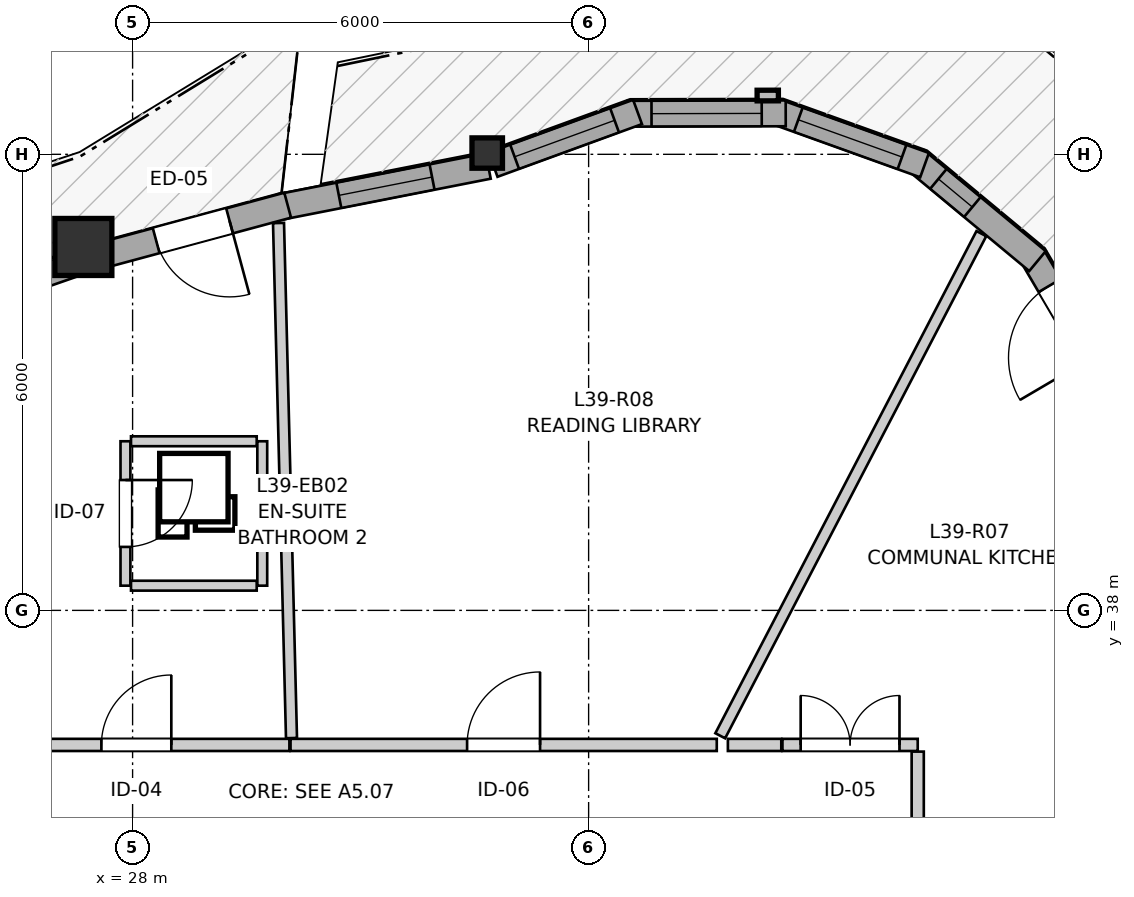
"""IFC4 building model, lengths in metres.
Left out: names, types, materials, properties, quantities, classifications, styles, units other than length and angle.
Written with IfcOpenShell. Run it as: python <this file> out.ifc"""

import sys

from ifc_helpers import new_model, si_unit, direction, frame, frame_2d, origin, origin_2d, place, context, subcontext, project, spatial, rectangle, i_section, extrude, source, transform, mapped, element, fill, save


model = new_model("IFC4")
c1 = context("Model", 3, precision=1e-05, world=origin(), true_north=direction((0.0, 1.0)))
c2 = subcontext(c1, "Body", "Model", "MODEL_VIEW")
j1 = project(units=[si_unit("LENGTHUNIT", "METRE"), si_unit("PLANEANGLEUNIT", "RADIAN")], contexts=[c1])
p1 = place(None, origin())
s1 = spatial("IfcSite", under=j1, at=p1, CompositionType="ELEMENT")
p2 = place(p1, origin())
s2 = spatial("IfcBuilding", under=s1, at=p2, CompositionType="ELEMENT")
p3 = place(p2, frame((0.0, 0.0, 133.0)))
s3 = spatial("IfcBuildingStorey", under=s2, at=p3, CompositionType="ELEMENT", Elevation=133.0)
m1 = source(origin(), c2, "Body", "SweptSolid", [
    extrude(i_section(OverallWidth=0.401, OverallDepth=0.399, WebThickness=0.023, FlangeThickness=0.036, FilletRadius=0.015, at=origin_2d()), origin(), (0.0, 0.0, 1.0), 2.95),
])
p4 = place(p3, frame((32.666, 44.017, 0.0), z_axis=(0.0, 0.0, 1.0), x_axis=(1.0, 0.0, 0.0)))
e1 = element("IfcColumn", 1, at=p4, inside=s3, PredefinedType="PILASTER", context=c2, shape_type="MappedRepresentation", body=[
    mapped(m1, transform((0.0, 0.0, 0.0), x_axis=(1.0, 0.0, 0.0), y_axis=(0.0, 1.0, 0.0), z_axis=(0.0, 0.0, 1.0), scale=1.0)),
])
m2 = source(origin(), c2, "Body", "SweptSolid", [
    extrude(rectangle(XDim=0.75, YDim=0.75, at=origin_2d()), origin(), (0.0, 0.0, 1.0), 2.95),
])
p5 = place(p3, frame((27.352, 42.781, 0.0), z_axis=(0.0, 0.0, 1.0), x_axis=(1.0, 0.0, 0.0)))
e2 = element("IfcColumn", 2, at=p5, inside=s3, PredefinedType="COLUMN", context=c2, shape_type="MappedRepresentation", body=[
    mapped(m2, transform((0.0, 0.0, 0.0), x_axis=(1.0, 0.0, 0.0), y_axis=(0.0, 1.0, 0.0), z_axis=(0.0, 0.0, 1.0), scale=1.0)),
])
p6 = place(p3, frame((40.873, 40.902, 0.0), z_axis=(0.0, 0.0, 1.0), x_axis=(-0.506225227923, 0.862401309493, 0.0)))
e3 = element("IfcWall", 3, at=p6, inside=s3, PredefinedType="SOLIDWALL", context=c2, shape_type="SweptSolid", body=[
    extrude(rectangle(XDim=2.081, YDim=0.34, at=frame_2d((1.041, 0.0))), origin(), (0.0, 0.0, 1.0), 2.53),
])
p7 = place(p6, frame((0.49, 0.0, 0.0)))
e4 = element("IfcOpeningElement", 4, at=p7, cuts=e3, PredefinedType="OPENING", context=c2, shape_type="SweptSolid", body=[
    extrude(rectangle(XDim=1.1, YDim=2.1, at=frame_2d((0.55, 1.05))), frame((0.0, 0.18, 0.0), z_axis=(0.0, -1.0, 0.0), x_axis=(1.0, 0.0, 0.0)), (0.0, 0.0, 1.0), 0.36),
])
p8 = place(p3, frame((39.906, 42.595, 0.0), z_axis=(0.0, 0.0, 1.0), x_axis=(-0.769584999316, 0.638544382817, 0.0)))
e5 = element("IfcWall", 5, at=p8, inside=s3, PredefinedType="SOLIDWALL", context=c2, shape_type="SweptSolid", body=[
    extrude(rectangle(XDim=2.081, YDim=0.34, at=frame_2d((1.041, 0.0))), origin(), (0.0, 0.0, 1.0), 2.53),
])
p9 = place(p8, frame((1.114, 0.0, 0.82)))
e6 = element("IfcOpeningElement", 6, at=p9, cuts=e5, PredefinedType="OPENING", context=c2, shape_type="SweptSolid", body=[
    extrude(rectangle(XDim=0.58, YDim=1.35, at=frame_2d((0.29, 0.675))), frame((0.0, 0.18, 0.0), z_axis=(0.0, -1.0, 0.0), x_axis=(1.0, 0.0, 0.0)), (0.0, 0.0, 1.0), 0.36),
])
p10 = place(p3, frame((38.42, 43.858, 0.0), z_axis=(0.0, 0.0, 1.0), x_axis=(-0.941071215914, 0.338208466153, 0.0)))
e7 = element("IfcWall", 7, at=p10, inside=s3, PredefinedType="SOLIDWALL", context=c2, shape_type="SweptSolid", body=[
    extrude(rectangle(XDim=2.081, YDim=0.34, at=frame_2d((1.041, 0.0))), origin(), (0.0, 0.0, 1.0), 2.53),
])
p11 = place(p10, frame((0.316, 0.0, 0.82)))
e8 = element("IfcOpeningElement", 8, at=p11, cuts=e7, PredefinedType="OPENING", context=c2, shape_type="SweptSolid", body=[
    extrude(rectangle(XDim=1.45, YDim=1.25, at=frame_2d((0.725, 0.625))), frame((0.0, 0.18, 0.0), z_axis=(0.0, -1.0, 0.0), x_axis=(1.0, 0.0, 0.0)), (0.0, 0.0, 1.0), 0.36),
])
p12 = place(p3, frame((36.593, 44.539, 0.0), z_axis=(0.0, 0.0, 1.0), x_axis=(-0.999996965272, -0.002463624621, 0.0)))
e9 = element("IfcWall", 9, at=p12, inside=s3, PredefinedType="SOLIDWALL", context=c2, shape_type="SweptSolid", body=[
    extrude(rectangle(XDim=2.081, YDim=0.34, at=frame_2d((1.041, 0.0))), origin(), (0.0, 0.0, 1.0), 2.53),
])
p13 = place(p12, frame((0.316, 0.0, 0.82)))
e10 = element("IfcOpeningElement", 10, at=p13, cuts=e9, PredefinedType="OPENING", context=c2, shape_type="SweptSolid", body=[
    extrude(rectangle(XDim=1.45, YDim=1.25, at=frame_2d((0.725, 0.625))), frame((0.0, 0.18, 0.0), z_axis=(0.0, -1.0, 0.0), x_axis=(1.0, 0.0, 0.0)), (0.0, 0.0, 1.0), 0.36),
])
p14 = place(p3, frame((34.644, 44.557, 0.0), z_axis=(0.0, 0.0, 1.0), x_axis=(-0.939440593615, -0.342711790092, 0.0)))
e11 = element("IfcWall", 11, at=p14, inside=s3, PredefinedType="SOLIDWALL", context=c2, shape_type="SweptSolid", body=[
    extrude(rectangle(XDim=2.023, YDim=0.34, at=frame_2d((1.012, 0.0))), origin(), (0.0, 0.0, 1.0), 2.53),
])
p15 = place(p14, frame((0.322, 0.0, 0.82)))
e12 = element("IfcOpeningElement", 12, at=p15, cuts=e11, PredefinedType="OPENING", context=c2, shape_type="SweptSolid", body=[
    extrude(rectangle(XDim=1.4, YDim=1.35, at=frame_2d((0.7, 0.675))), frame((0.0, 0.18, 0.0), z_axis=(0.0, -1.0, 0.0), x_axis=(1.0, 0.0, 0.0)), (0.0, 0.0, 1.0), 0.36),
])
p16 = place(p3, frame((32.679, 43.846, 0.0), z_axis=(0.0, 0.0, 1.0), x_axis=(-0.981247929568, -0.192749839736, 0.0)))
e13 = element("IfcWall", 13, at=p16, inside=s3, PredefinedType="SOLIDWALL", context=c2, shape_type="SweptSolid", body=[
    extrude(rectangle(XDim=2.776, YDim=0.34, at=frame_2d((1.388, 0.0))), origin(), (0.0, 0.0, 1.0), 2.53),
])
p17 = place(p16, frame((0.753, 0.0, 0.82)))
e14 = element("IfcOpeningElement", 14, at=p17, cuts=e13, PredefinedType="OPENING", context=c2, shape_type="SweptSolid", body=[
    extrude(rectangle(XDim=1.25, YDim=1.35, at=frame_2d((0.625, 0.675))), frame((0.0, 0.18, 0.0), z_axis=(0.0, -1.0, 0.0), x_axis=(1.0, 0.0, 0.0)), (0.0, 0.0, 1.0), 0.36),
])
p18 = place(p3, frame((30.04, 43.331, 0.0), z_axis=(0.0, 0.0, 1.0), x_axis=(-0.965460468502, -0.260549580233, 0.0)))
e15 = element("IfcWall", 15, at=p18, inside=s3, PredefinedType="SOLIDWALL", context=c2, shape_type="SweptSolid", body=[
    extrude(rectangle(XDim=2.583, YDim=0.34, at=frame_2d((1.292, 0.0))), origin(), (0.0, 0.0, 1.0), 2.53),
])
p19 = place(p18, frame((0.792, 0.0, 0.0)))
e16 = element("IfcOpeningElement", 16, at=p19, cuts=e15, PredefinedType="OPENING", context=c2, shape_type="SweptSolid", body=[
    extrude(rectangle(XDim=1.0, YDim=2.1, at=frame_2d((0.5, 1.05))), frame((0.0, 0.18, 0.0), z_axis=(0.0, -1.0, 0.0), x_axis=(1.0, 0.0, 0.0)), (0.0, 0.0, 1.0), 0.36),
])
p20 = place(p3, frame((27.262, 42.57, 0.0), z_axis=(0.0, 0.0, 1.0), x_axis=(-0.944148723561, -0.329519631884, 0.0)))
e17 = element("IfcWall", 17, at=p20, inside=s3, PredefinedType="SOLIDWALL", context=c2, shape_type="SweptSolid", body=[
    extrude(rectangle(XDim=2.54, YDim=0.34, at=frame_2d((1.27, 0.0))), origin(), (0.0, 0.0, 1.0), 2.53),
])
p21 = place(p20, frame((0.54, 0.0, 0.82)))
e18 = element("IfcOpeningElement", 18, at=p21, cuts=e17, PredefinedType="OPENING", context=c2, shape_type="SweptSolid", body=[
    extrude(rectangle(XDim=1.45, YDim=1.25, at=frame_2d((0.725, 0.625))), frame((0.0, 0.18, 0.0), z_axis=(0.0, -1.0, 0.0), x_axis=(1.0, 0.0, 0.0)), (0.0, 0.0, 1.0), 0.36),
])
p22 = place(p3, frame((30.078, 36.23, 0.0), z_axis=(0.0, 0.0, 1.0), x_axis=(1.0, 0.0, 0.0)))
e19 = element("IfcWall", 19, at=p22, inside=s3, PredefinedType="PARTITIONING", context=c2, shape_type="SweptSolid", body=[
    extrude(rectangle(XDim=5.608, YDim=0.16, at=frame_2d((2.804, 0.0))), origin(), (0.0, 0.0, 1.0), 2.588),
])
p23 = place(p22, frame((2.323, 0.0, 0.0)))
e20 = element("IfcOpeningElement", 20, at=p23, cuts=e19, PredefinedType="OPENING", context=c2, shape_type="SweptSolid", body=[
    extrude(rectangle(XDim=0.96, YDim=2.1, at=frame_2d((0.48, 1.05))), frame((0.0, 0.09, 0.0), z_axis=(0.0, -1.0, 0.0), x_axis=(1.0, 0.0, 0.0)), (0.0, 0.0, 1.0), 0.18),
])
p24 = place(p3, frame((25.99, 36.23, 0.0), z_axis=(0.0, 0.0, 1.0), x_axis=(1.0, 0.0, 0.0)))
e21 = element("IfcWall", 21, at=p24, inside=s3, PredefinedType="PARTITIONING", context=c2, shape_type="SweptSolid", body=[
    extrude(rectangle(XDim=4.073, YDim=0.16, at=frame_2d((2.037, 0.0))), origin(), (0.0, 0.0, 1.0), 2.95),
])
p25 = place(p24, frame((1.6, 0.0, 0.0)))
e22 = element("IfcOpeningElement", 22, at=p25, cuts=e21, PredefinedType="OPENING", context=c2, shape_type="SweptSolid", body=[
    extrude(rectangle(XDim=0.92, YDim=2.1, at=frame_2d((0.46, 1.05))), frame((0.0, 0.09, 0.0), z_axis=(0.0, -1.0, 0.0), x_axis=(1.0, 0.0, 0.0)), (0.0, 0.0, 1.0), 0.18),
])
p26 = place(p3, frame((27.906, 40.225, 0.0), z_axis=(0.0, 0.0, 1.0), x_axis=(0.0, -1.0, 0.0)))
e23 = element("IfcWall", 23, at=p26, inside=s3, PredefinedType="PARTITIONING", context=c2, shape_type="SweptSolid", body=[
    extrude(rectangle(XDim=1.9, YDim=0.13, at=frame_2d((0.95, 0.0))), origin(), (0.0, 0.0, 1.0), 2.318),
])
p27 = place(p26, frame((0.51, 0.0, 0.0)))
e24 = element("IfcOpeningElement", 24, at=p27, cuts=e23, PredefinedType="OPENING", context=c2, shape_type="SweptSolid", body=[
    extrude(rectangle(XDim=0.88, YDim=2.05, at=frame_2d((0.44, 1.025))), frame((0.0, 0.075, 0.0), z_axis=(0.0, -1.0, 0.0), x_axis=(1.0, 0.0, 0.0)), (0.0, 0.0, 1.0), 0.15),
])
p28 = place(p3, frame((36.55, 36.23, 0.0), z_axis=(0.0, 0.0, 1.0), x_axis=(1.0, 0.0, 0.0)))
e25 = element("IfcWall", 25, at=p28, inside=s3, PredefinedType="PARTITIONING", context=c2, shape_type="SweptSolid", body=[
    extrude(rectangle(XDim=1.78, YDim=0.16, at=frame_2d((0.89, 0.0))), origin(), (0.0, 0.0, 1.0), 2.95),
])
p29 = place(p28, frame((0.24, 0.0, 0.0)))
e26 = element("IfcOpeningElement", 26, at=p29, cuts=e25, PredefinedType="OPENING", context=c2, shape_type="SweptSolid", body=[
    extrude(rectangle(XDim=1.3, YDim=2.1, at=frame_2d((0.65, 1.05))), frame((0.0, 0.09, 0.0), z_axis=(0.0, -1.0, 0.0), x_axis=(1.0, 0.0, 0.0)), (0.0, 0.0, 1.0), 0.18),
])
p30 = place(p3, frame((35.732, 36.351, 0.0), z_axis=(0.0, 0.0, 1.0), x_axis=(0.461386804, 0.887199085378, 0.0)))
e27 = element("IfcWall", 27, at=p30, inside=s3, PredefinedType="PARTITIONING", context=c2, shape_type="SweptSolid", body=[
    extrude(rectangle(XDim=7.446, YDim=0.145, at=frame_2d((3.723, 0.0))), origin(), (0.0, 0.0, 1.0), 2.95),
])
p31 = place(p3, frame((29.92, 43.096, 0.0), z_axis=(0.0, 0.0, 1.0), x_axis=(0.025211755772, -0.999682133166, 0.0)))
e28 = element("IfcWall", 28, at=p31, inside=s3, PredefinedType="PARTITIONING", context=c2, shape_type="SweptSolid", body=[
    extrude(rectangle(XDim=6.779, YDim=0.145, at=frame_2d((3.389, 0.0))), origin(), (0.0, 0.0, 1.0), 2.95),
])
p32 = place(p3, frame((38.465, 33.405, 0.0), z_axis=(0.0, 0.0, 1.0), x_axis=(0.738623645331, 0.674118024205, 0.0)))
e29 = element("IfcWall", 29, at=p32, inside=s3, PredefinedType="PARTITIONING", context=c2, shape_type="SweptSolid", body=[
    extrude(rectangle(XDim=4.629, YDim=0.145, at=frame_2d((2.314, 0.0))), origin(), (0.0, 0.0, 1.0), 2.95),
])
p33 = place(p3, frame((29.706, 38.325, 0.0), z_axis=(0.0, 0.0, 1.0), x_axis=(0.0, 1.0, 0.0)))
e30 = element("IfcWall", 30, at=p33, inside=s3, PredefinedType="PARTITIONING", context=c2, shape_type="SweptSolid", body=[
    extrude(rectangle(XDim=1.9, YDim=0.13, at=frame_2d((0.95, 0.0))), origin(), (0.0, 0.0, 1.0), 2.95),
])
p34 = place(p3, frame((27.979, 40.225, 0.0), z_axis=(0.0, 0.0, 1.0), x_axis=(1.0, 0.0, 0.0)))
e31 = element("IfcWall", 31, at=p34, inside=s3, PredefinedType="PARTITIONING", context=c2, shape_type="SweptSolid", body=[
    extrude(rectangle(XDim=1.654, YDim=0.13, at=frame_2d((0.827, 0.0))), origin(), (0.0, 0.0, 1.0), 2.558),
])
p35 = place(p3, frame((27.979, 38.325, 0.0), z_axis=(0.0, 0.0, 1.0), x_axis=(1.0, 0.0, 0.0)))
e32 = element("IfcWall", 32, at=p35, inside=s3, PredefinedType="PARTITIONING", context=c2, shape_type="SweptSolid", body=[
    extrude(rectangle(XDim=1.654, YDim=0.13, at=frame_2d((0.827, 0.0))), origin(), (0.0, 0.0, 1.0), 2.95),
])
p36 = place(p3, frame((38.33, 34.45, 0.0), z_axis=(0.0, 0.0, 1.0), x_axis=(0.0, 1.0, 0.0)))
e33 = element("IfcWall", 33, at=p36, inside=s3, PredefinedType="PARTITIONING", context=c2, shape_type="SweptSolid", body=[
    extrude(rectangle(XDim=1.692, YDim=0.16, at=frame_2d((0.846, 0.0))), origin(), (0.0, 0.0, 1.0), 2.588),
])
p37 = place(p3, frame((35.832, 36.23, 0.0), z_axis=(0.0, 0.0, 1.0), x_axis=(1.0, 0.0, 0.0)))
e34 = element("IfcWall", 34, at=p37, inside=s3, PredefinedType="PARTITIONING", context=c2, shape_type="SweptSolid", body=[
    extrude(rectangle(XDim=0.703, YDim=0.16, at=frame_2d((0.351, 0.0))), origin(), (0.0, 0.0, 1.0), 2.95),
])
m3 = source(origin(), c2, "Body", "SweptSolid", [
    extrude(rectangle(XDim=1.1, YDim=2.1, at=frame_2d((0.55, 1.05))), frame((0.0, 0.025, 0.0), z_axis=(0.0, -1.0, 0.0), x_axis=(1.0, 0.0, 0.0)), (0.0, 0.0, 1.0), 0.05),
])
p38 = place(p7, origin())
e35 = element("IfcDoor", 35, at=p38, inside=s3, OperationType="SINGLE_SWING_LEFT", PredefinedType="DOOR", context=c2, shape_type="MappedRepresentation", body=[
    mapped(m3, transform((0.0, 0.0, 0.0), x_axis=(1.0, 0.0, 0.0), y_axis=(0.0, 1.0, 0.0), z_axis=(0.0, 0.0, 1.0), scale=1.0)),
])
fill(e4, e35)
m4 = source(origin(), c2, "Body", "SweptSolid", [
    extrude(rectangle(XDim=0.58, YDim=1.35, at=frame_2d((0.29, 0.675))), frame((0.0, 0.03, 0.0), z_axis=(0.0, -1.0, 0.0), x_axis=(1.0, 0.0, 0.0)), (0.0, 0.0, 1.0), 0.06),
])
p39 = place(p9, origin())
e36 = element("IfcWindow", 36, at=p39, inside=s3, PartitioningType="SINGLE_PANEL", PredefinedType="WINDOW", context=c2, shape_type="MappedRepresentation", body=[
    mapped(m4, transform((0.0, 0.0, 0.0), x_axis=(1.0, 0.0, 0.0), y_axis=(0.0, 1.0, 0.0), z_axis=(0.0, 0.0, 1.0), scale=1.0)),
])
fill(e6, e36)
m5 = source(origin(), c2, "Body", "SweptSolid", [
    extrude(rectangle(XDim=1.45, YDim=1.25, at=frame_2d((0.725, 0.625))), frame((0.0, 0.03, 0.0), z_axis=(0.0, -1.0, 0.0), x_axis=(1.0, 0.0, 0.0)), (0.0, 0.0, 1.0), 0.06),
])
p40 = place(p11, origin())
e37 = element("IfcWindow", 37, at=p40, inside=s3, PartitioningType="SINGLE_PANEL", PredefinedType="WINDOW", context=c2, shape_type="MappedRepresentation", body=[
    mapped(m5, transform((0.0, 0.0, 0.0), x_axis=(1.0, 0.0, 0.0), y_axis=(0.0, 1.0, 0.0), z_axis=(0.0, 0.0, 1.0), scale=1.0)),
])
fill(e8, e37)
p41 = place(p13, origin())
e38 = element("IfcWindow", 38, at=p41, inside=s3, PartitioningType="SINGLE_PANEL", PredefinedType="WINDOW", context=c2, shape_type="MappedRepresentation", body=[
    mapped(m5, transform((0.0, 0.0, 0.0), x_axis=(1.0, 0.0, 0.0), y_axis=(0.0, 1.0, 0.0), z_axis=(0.0, 0.0, 1.0), scale=1.0)),
])
fill(e10, e38)
m6 = source(origin(), c2, "Body", "SweptSolid", [
    extrude(rectangle(XDim=1.4, YDim=1.35, at=frame_2d((0.7, 0.675))), frame((0.0, 0.03, 0.0), z_axis=(0.0, -1.0, 0.0), x_axis=(1.0, 0.0, 0.0)), (0.0, 0.0, 1.0), 0.06),
])
p42 = place(p15, origin())
e39 = element("IfcWindow", 39, at=p42, inside=s3, PartitioningType="SINGLE_PANEL", PredefinedType="WINDOW", context=c2, shape_type="MappedRepresentation", body=[
    mapped(m6, transform((0.0, 0.0, 0.0), x_axis=(1.0, 0.0, 0.0), y_axis=(0.0, 1.0, 0.0), z_axis=(0.0, 0.0, 1.0), scale=1.0)),
])
fill(e12, e39)
m7 = source(origin(), c2, "Body", "SweptSolid", [
    extrude(rectangle(XDim=1.25, YDim=1.35, at=frame_2d((0.625, 0.675))), frame((0.0, 0.03, 0.0), z_axis=(0.0, -1.0, 0.0), x_axis=(1.0, 0.0, 0.0)), (0.0, 0.0, 1.0), 0.06),
])
p43 = place(p17, origin())
e40 = element("IfcWindow", 40, at=p43, inside=s3, PartitioningType="SINGLE_PANEL", PredefinedType="WINDOW", context=c2, shape_type="MappedRepresentation", body=[
    mapped(m7, transform((0.0, 0.0, 0.0), x_axis=(1.0, 0.0, 0.0), y_axis=(0.0, 1.0, 0.0), z_axis=(0.0, 0.0, 1.0), scale=1.0)),
])
fill(e14, e40)
m8 = source(origin(), c2, "Body", "SweptSolid", [
    extrude(rectangle(XDim=1.0, YDim=2.1, at=frame_2d((0.5, 1.05))), frame((0.0, 0.025, 0.0), z_axis=(0.0, -1.0, 0.0), x_axis=(1.0, 0.0, 0.0)), (0.0, 0.0, 1.0), 0.05),
])
p44 = place(p19, origin())
e41 = element("IfcDoor", 41, at=p44, inside=s3, OperationType="SINGLE_SWING_LEFT", PredefinedType="DOOR", context=c2, shape_type="MappedRepresentation", body=[
    mapped(m8, transform((0.0, 0.0, 0.0), x_axis=(1.0, 0.0, 0.0), y_axis=(0.0, 1.0, 0.0), z_axis=(0.0, 0.0, 1.0), scale=1.0)),
])
fill(e16, e41)
m9 = source(origin(), c2, "Body", "SweptSolid", [
    extrude(rectangle(XDim=0.96, YDim=2.1, at=frame_2d((0.48, 1.05))), frame((0.0, 0.025, 0.0), z_axis=(0.0, -1.0, 0.0), x_axis=(1.0, 0.0, 0.0)), (0.0, 0.0, 1.0), 0.05),
])
p45 = place(p23, origin())
e42 = element("IfcDoor", 42, at=p45, inside=s3, OperationType="SINGLE_SWING_RIGHT", PredefinedType="DOOR", context=c2, shape_type="MappedRepresentation", body=[
    mapped(m9, transform((0.0, 0.0, 0.0), x_axis=(1.0, 0.0, 0.0), y_axis=(0.0, 1.0, 0.0), z_axis=(0.0, 0.0, 1.0), scale=1.0)),
])
fill(e20, e42)
m10 = source(origin(), c2, "Body", "SweptSolid", [
    extrude(rectangle(XDim=0.92, YDim=2.1, at=frame_2d((0.46, 1.05))), frame((0.0, 0.025, 0.0), z_axis=(0.0, -1.0, 0.0), x_axis=(1.0, 0.0, 0.0)), (0.0, 0.0, 1.0), 0.05),
])
p46 = place(p25, origin())
e43 = element("IfcDoor", 43, at=p46, inside=s3, OperationType="SINGLE_SWING_RIGHT", PredefinedType="DOOR", context=c2, shape_type="MappedRepresentation", body=[
    mapped(m10, transform((0.0, 0.0, 0.0), x_axis=(1.0, 0.0, 0.0), y_axis=(0.0, 1.0, 0.0), z_axis=(0.0, 0.0, 1.0), scale=1.0)),
])
fill(e22, e43)
m11 = source(origin(), c2, "Body", "SweptSolid", [
    extrude(rectangle(XDim=0.88, YDim=2.05, at=frame_2d((0.44, 1.025))), frame((0.0, 0.025, 0.0), z_axis=(0.0, -1.0, 0.0), x_axis=(1.0, 0.0, 0.0)), (0.0, 0.0, 1.0), 0.05),
])
p47 = place(p27, origin())
e44 = element("IfcDoor", 44, at=p47, inside=s3, OperationType="SINGLE_SWING_LEFT", PredefinedType="DOOR", context=c2, shape_type="MappedRepresentation", body=[
    mapped(m11, transform((0.0, 0.0, 0.0), x_axis=(1.0, 0.0, 0.0), y_axis=(0.0, 1.0, 0.0), z_axis=(0.0, 0.0, 1.0), scale=1.0)),
])
fill(e24, e44)
m12 = source(origin(), c2, "Body", "SweptSolid", [
    extrude(rectangle(XDim=1.3, YDim=2.1, at=frame_2d((0.65, 1.05))), frame((0.0, 0.025, 0.0), z_axis=(0.0, -1.0, 0.0), x_axis=(1.0, 0.0, 0.0)), (0.0, 0.0, 1.0), 0.05),
])
p48 = place(p29, origin())
e45 = element("IfcDoor", 45, at=p48, inside=s3, OperationType="DOUBLE_DOOR_SINGLE_SWING", PredefinedType="DOOR", context=c2, shape_type="MappedRepresentation", body=[
    mapped(m12, transform((0.0, 0.0, 0.0), x_axis=(1.0, 0.0, 0.0), y_axis=(0.0, 1.0, 0.0), z_axis=(0.0, 0.0, 1.0), scale=1.0)),
])
fill(e26, e45)
save(model, sys.argv[1])
